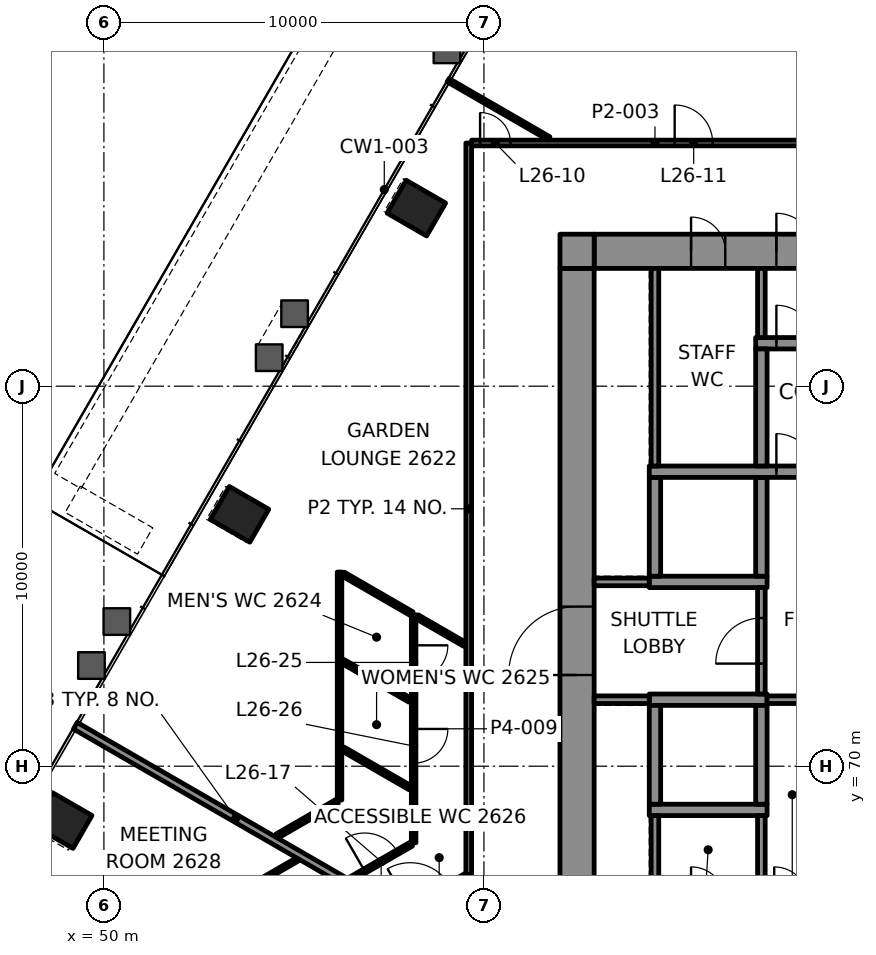
"""IFC4 building model, lengths in metres.
Left out: names, types, materials, properties, quantities, classifications, styles, units other than length and angle.
Written with IfcOpenShell. Run it as: python <this file> out.ifc"""

import sys

from ifc_helpers import new_model, si_unit, direction, frame, frame_2d, origin, origin_2d, place, context, subcontext, project, spatial, rectangle, extrude, element, fill, save


model = new_model("IFC4")
c1 = context("Model", 3, precision=1e-05, world=origin(), true_north=direction((0.0, 1.0)))
c2 = subcontext(c1, "Body", "Model", "MODEL_VIEW")
j1 = project(units=[si_unit("LENGTHUNIT", "METRE"), si_unit("PLANEANGLEUNIT", "RADIAN")], contexts=[c1])
p1 = place(None, origin())
s1 = spatial("IfcSite", under=j1, at=p1, CompositionType="ELEMENT")
p2 = place(p1, origin())
s2 = spatial("IfcBuilding", under=s1, at=p2, CompositionType="ELEMENT")
p3 = place(p2, frame((0.0, 0.0, 115.6)))
s3 = spatial("IfcBuildingStorey", under=s2, at=p3, CompositionType="ELEMENT", Elevation=115.6)
for number, where, z_axis, x_axis in (
    (1, (58.222, 84.687, -0.0), (0.0, 0.0, 1.0), (-0.5, -0.866, 0.0)),
    (2, (53.569, 76.628, -0.0), (0.0, 0.0, 1.0), (-0.5, -0.866, 0.0)),
    (3, (48.917, 68.57, -0.0), (0.0, 0.0, 1.0), (-0.5, -0.866, 0.0)),
):
    element("IfcColumn", number, at=place(p3, frame(where, z_axis=z_axis, x_axis=x_axis)), inside=s3, PredefinedType="COLUMN", context=c2, shape_type="SweptSolid", body=[
        extrude(rectangle(XDim=1.0, YDim=1.2, at=origin_2d()), origin(), (0.0, 0.0, 1.0), 4.2),
    ])
p4 = place(p3, frame((62.9, 83.55, 0.0), z_axis=(0.0, 0.0, 1.0), x_axis=(1.0, 0.0, 0.0)))
e4 = element("IfcWall", 4, at=p4, inside=s3, PredefinedType="SHEAR", context=c2, shape_type="SweptSolid", body=[
    extrude(rectangle(XDim=25.1, YDim=0.9, at=frame_2d((12.55, 0.0))), origin(), (0.0, 0.0, 1.0), 4.0),
])
p5 = place(p4, frame((4.795, 0.0, 0.0)))
e5 = element("IfcOpeningElement", 5, at=p5, cuts=e4, PredefinedType="OPENING", context=c2, shape_type="SweptSolid", body=[
    extrude(rectangle(XDim=1.0, YDim=2.1, at=frame_2d((0.5, 1.05))), frame((0.0, 0.46, 0.0), z_axis=(0.0, -1.0, 0.0), x_axis=(1.0, 0.0, 0.0)), (0.0, 0.0, 1.0), 0.92),
])
p6 = place(p4, frame((18.605, 0.0, 0.0)))
e6 = element("IfcOpeningElement", 6, at=p6, cuts=e4, PredefinedType="OPENING", context=c2, shape_type="SweptSolid", body=[
    extrude(rectangle(XDim=1.0, YDim=2.1, at=frame_2d((0.5, 1.05))), frame((0.0, 0.46, 0.0), z_axis=(0.0, -1.0, 0.0), x_axis=(1.0, 0.0, 0.0)), (0.0, 0.0, 1.0), 0.92),
])
p7 = place(p4, frame((2.55, 0.0, 0.0)))
e7 = element("IfcOpeningElement", 7, at=p7, cuts=e4, PredefinedType="OPENING", context=c2, shape_type="SweptSolid", body=[
    extrude(rectangle(XDim=0.9, YDim=2.1, at=frame_2d((0.45, 1.05))), frame((0.0, 0.46, 0.0), z_axis=(0.0, -1.0, 0.0), x_axis=(1.0, 0.0, 0.0)), (0.0, 0.0, 1.0), 0.92),
])
p8 = place(p4, frame((11.75, 0.0, 0.0)))
e8 = element("IfcOpeningElement", 8, at=p8, cuts=e4, PredefinedType="OPENING", context=c2, shape_type="SweptSolid", body=[
    extrude(rectangle(XDim=0.9, YDim=2.1, at=frame_2d((0.45, 1.05))), frame((0.0, 0.46, 0.0), z_axis=(0.0, -1.0, 0.0), x_axis=(1.0, 0.0, 0.0)), (0.0, 0.0, 1.0), 0.92),
])
p9 = place(p4, frame((21.65, 0.0, 0.0)))
e9 = element("IfcOpeningElement", 9, at=p9, cuts=e4, PredefinedType="OPENING", context=c2, shape_type="SweptSolid", body=[
    extrude(rectangle(XDim=0.9, YDim=2.1, at=frame_2d((0.45, 1.05))), frame((0.0, 0.46, 0.0), z_axis=(0.0, -1.0, 0.0), x_axis=(1.0, 0.0, 0.0)), (0.0, 0.0, 1.0), 0.92),
])
p10 = place(p3, frame((62.45, 66.9, 0.0), z_axis=(0.0, 0.0, 1.0), x_axis=(0.0, 1.0, 0.0)))
e10 = element("IfcWall", 10, at=p10, inside=s3, PredefinedType="SHEAR", context=c2, shape_type="SweptSolid", body=[
    extrude(rectangle(XDim=16.2, YDim=0.9, at=frame_2d((8.1, 0.0))), origin(), (0.0, 0.0, 1.0), 4.0),
])
p11 = place(p10, frame((5.5, 0.0, 0.0)))
e11 = element("IfcOpeningElement", 11, at=p11, cuts=e10, PredefinedType="OPENING", context=c2, shape_type="SweptSolid", body=[
    extrude(rectangle(XDim=1.8, YDim=2.1, at=frame_2d((0.9, 1.05))), frame((0.0, 0.46, 0.0), z_axis=(0.0, -1.0, 0.0), x_axis=(1.0, 0.0, 0.0)), (0.0, 0.0, 1.0), 0.92),
])
for number, where, z_axis, x_axis in (
    (12, (64.35, 68.85, 0.0), (0.0, 0.0, 1.0), (1.0, 0.0, 0.0)),
    (13, (64.35, 71.75, 0.0), (0.0, 0.0, 1.0), (1.0, 0.0, 0.0)),
    (14, (64.35, 74.85, 0.0), (0.0, 0.0, 1.0), (1.0, 0.0, 0.0)),
):
    element("IfcWall", number, at=place(p3, frame(where, z_axis=z_axis, x_axis=x_axis)), inside=s3, PredefinedType="SHEAR", context=c2, shape_type="SweptSolid", body=[
        extrude(rectangle(XDim=3.1, YDim=0.3, at=frame_2d((1.55, 0.0))), origin(), (0.0, 0.0, 1.0), 4.0),
    ])
for number, where, z_axis, x_axis in (
    (15, (64.5, 69.0, 0.0), (0.0, 0.0, 1.0), (0.0, 1.0, 0.0)),
    (16, (64.5, 75.0, 0.0), (0.0, 0.0, 1.0), (0.0, 1.0, 0.0)),
    (17, (67.3, 69.0, 0.0), (0.0, 0.0, 1.0), (0.0, 1.0, 0.0)),
    (18, (67.3, 75.0, 0.0), (0.0, 0.0, 1.0), (0.0, 1.0, 0.0)),
):
    element("IfcWall", number, at=place(p3, frame(where, z_axis=z_axis, x_axis=x_axis)), inside=s3, PredefinedType="SHEAR", context=c2, shape_type="SweptSolid", body=[
        extrude(rectangle(XDim=2.6, YDim=0.3, at=frame_2d((1.3, 0.0))), origin(), (0.0, 0.0, 1.0), 4.0),
    ])
p12 = place(p3, frame((64.35, 77.75, 0.0), z_axis=(0.0, 0.0, 1.0), x_axis=(1.0, 0.0, 0.0)))
e19 = element("IfcWall", 19, at=p12, inside=s3, PredefinedType="SHEAR", context=c2, shape_type="SweptSolid", body=[
    extrude(rectangle(XDim=22.75, YDim=0.3, at=frame_2d((11.375, 0.0))), origin(), (0.0, 0.0, 1.0), 4.0),
])
p13 = place(p12, frame((3.345, 0.0, 0.0)))
e20 = element("IfcOpeningElement", 20, at=p13, cuts=e19, PredefinedType="OPENING", context=c2, shape_type="SweptSolid", body=[
    extrude(rectangle(XDim=1.0, YDim=2.1, at=frame_2d((0.5, 1.05))), frame((0.0, 0.16, 0.0), z_axis=(0.0, -1.0, 0.0), x_axis=(1.0, 0.0, 0.0)), (0.0, 0.0, 1.0), 0.32),
])
p14 = place(p3, frame((67.15, 81.13, 0.0), z_axis=(0.0, 0.0, 1.0), x_axis=(1.0, 0.0, 0.0)))
e21 = element("IfcWall", 21, at=p14, inside=s3, PredefinedType="SHEAR", context=c2, shape_type="SweptSolid", body=[
    extrude(rectangle(XDim=6.91, YDim=0.3, at=frame_2d((3.455, 0.0))), origin(), (0.0, 0.0, 1.0), 4.0),
])
p15 = place(p14, frame((0.545, 0.0, 0.0)))
e22 = element("IfcOpeningElement", 22, at=p15, cuts=e21, PredefinedType="OPENING", context=c2, shape_type="SweptSolid", body=[
    extrude(rectangle(XDim=1.0, YDim=2.1, at=frame_2d((0.5, 1.05))), frame((0.0, 0.16, 0.0), z_axis=(0.0, -1.0, 0.0), x_axis=(1.0, 0.0, 0.0)), (0.0, 0.0, 1.0), 0.32),
])
p16 = place(p3, frame((67.3, 77.9, 0.0), z_axis=(0.0, 0.0, 1.0), x_axis=(0.0, 1.0, 0.0)))
e23 = element("IfcWall", 23, at=p16, inside=s3, PredefinedType="SHEAR", context=c2, shape_type="SweptSolid", body=[
    extrude(rectangle(XDim=3.08, YDim=0.3, at=frame_2d((1.54, 0.0))), origin(), (0.0, 0.0, 1.0), 4.0),
])
p17 = place(p3, frame((62.0, 83.55, 0.0), z_axis=(0.0, 0.0, 1.0), x_axis=(1.0, 0.0, 0.0)))
e24 = element("IfcWall", 24, at=p17, inside=s3, PredefinedType="SHEAR", context=c2, shape_type="SweptSolid", body=[
    extrude(rectangle(XDim=0.9, YDim=0.9, at=frame_2d((0.45, 0.0))), origin(), (0.0, 0.0, 1.0), 4.0),
])
p18 = place(p3, frame((59.676, 86.4, 0.0), z_axis=(0.0, 0.0, 1.0), x_axis=(1.0, 0.0, 0.0)))
e25 = element("IfcWall", 25, at=p18, inside=s3, PredefinedType="PARTITIONING", context=c2, shape_type="SweptSolid", body=[
    extrude(rectangle(XDim=9.649, YDim=0.15, at=frame_2d((4.825, 0.0))), origin(), (0.0, 0.0, 1.0), 3.4),
])
p19 = place(p18, frame((0.223, 0.0, 0.0)))
e26 = element("IfcOpeningElement", 26, at=p19, cuts=e25, PredefinedType="OPENING", context=c2, shape_type="SweptSolid", body=[
    extrude(rectangle(XDim=0.8, YDim=2.1, at=frame_2d((0.4, 1.05))), frame((0.0, 0.085, 0.0), z_axis=(0.0, -1.0, 0.0), x_axis=(1.0, 0.0, 0.0)), (0.0, 0.0, 1.0), 0.17),
])
p20 = place(p18, frame((5.343, 0.0, 0.0)))
e27 = element("IfcOpeningElement", 27, at=p20, cuts=e25, PredefinedType="OPENING", context=c2, shape_type="SweptSolid", body=[
    extrude(rectangle(XDim=1.0, YDim=2.1, at=frame_2d((0.5, 1.05))), frame((0.0, 0.085, 0.0), z_axis=(0.0, -1.0, 0.0), x_axis=(1.0, 0.0, 0.0)), (0.0, 0.0, 1.0), 0.17),
])
p21 = place(p3, frame((47.866, 60.374, 0.0), z_axis=(0.0, 0.0, 1.0), x_axis=(0.866031566243, 0.499989326157, 0.0)))
e28 = element("IfcWall", 28, at=p21, inside=s3, PredefinedType="PARTITIONING", context=c2, shape_type="SweptSolid", body=[
    extrude(rectangle(XDim=13.462, YDim=0.15, at=frame_2d((6.731, 0.0))), origin(), (0.0, 0.0, 1.0), 3.4),
])
p22 = place(p21, frame((11.774, 0.0, 0.0)))
e29 = element("IfcOpeningElement", 29, at=p22, cuts=e28, PredefinedType="OPENING", context=c2, shape_type="SweptSolid", body=[
    extrude(rectangle(XDim=1.2, YDim=2.1, at=frame_2d((0.6, 1.05))), frame((0.0, 0.085, 0.0), z_axis=(0.0, -1.0, 0.0), x_axis=(1.0, 0.0, 0.0)), (0.0, 0.0, 1.0), 0.17),
])
p23 = place(p3, frame((56.501, 67.033, 0.0), z_axis=(0.0, 0.0, 1.0), x_axis=(0.866023842607, 0.500002704028, 0.0)))
e30 = element("IfcWall", 30, at=p23, inside=s3, PredefinedType="PARTITIONING", context=c2, shape_type="SweptSolid", body=[
    extrude(rectangle(XDim=1.835, YDim=0.12, at=frame_2d((0.917, 0.0))), origin(), (0.0, 0.0, 1.0), 3.4),
])
p24 = place(p23, frame((0.417, 0.0, 0.0)))
e31 = element("IfcOpeningElement", 31, at=p24, cuts=e30, PredefinedType="OPENING", context=c2, shape_type="SweptSolid", body=[
    extrude(rectangle(XDim=1.0, YDim=2.1, at=frame_2d((0.5, 1.05))), frame((0.0, 0.07, 0.0), z_axis=(0.0, -1.0, 0.0), x_axis=(1.0, 0.0, 0.0)), (0.0, 0.0, 1.0), 0.14),
])
p25 = place(p3, frame((55.09, 67.547, 0.0), z_axis=(0.0, 0.0, 1.0), x_axis=(-0.8660245535, -0.500001472733, 0.0)))
e32 = element("IfcWall", 32, at=p25, inside=s3, PredefinedType="PARTITIONING", context=c2, shape_type="SweptSolid", body=[
    extrude(rectangle(XDim=6.968, YDim=0.1, at=frame_2d((3.484, 0.0))), origin(), (0.0, 0.0, 1.0), 3.4),
])
p26 = place(p25, frame((3.034, 0.0, 0.0)))
e33 = element("IfcOpeningElement", 33, at=p26, cuts=e32, PredefinedType="OPENING", context=c2, shape_type="SweptSolid", body=[
    extrude(rectangle(XDim=0.9, YDim=2.1, at=frame_2d((0.45, 1.05))), frame((0.0, 0.06, 0.0), z_axis=(0.0, -1.0, 0.0), x_axis=(1.0, 0.0, 0.0)), (0.0, 0.0, 1.0), 0.12),
])
p27 = place(p3, frame((54.551, 68.159, 0.0), z_axis=(0.0, 0.0, 1.0), x_axis=(0.866023842607, 0.500002704028, 0.0)))
e34 = element("IfcWall", 34, at=p27, inside=s3, PredefinedType="PARTITIONING", context=c2, shape_type="SweptSolid", body=[
    extrude(rectangle(XDim=1.835, YDim=0.12, at=frame_2d((0.917, 0.0))), origin(), (0.0, 0.0, 1.0), 3.4),
])
p28 = place(p3, frame((59.6, 67.148, 0.0), z_axis=(0.0, 0.0, 1.0), x_axis=(0.0, 1.0, 0.0)))
e35 = element("IfcWall", 35, at=p28, inside=s3, PredefinedType="PARTITIONING", context=c2, shape_type="SweptSolid", body=[
    extrude(rectangle(XDim=19.251, YDim=0.15, at=frame_2d((9.626, 0.0))), origin(), (0.0, 0.0, 1.0), 3.4),
])
p29 = place(p3, frame((58.15, 73.984, 0.0), z_axis=(0.0, 0.0, 1.0), x_axis=(0.0, -1.0, 0.0)))
e36 = element("IfcWall", 36, at=p29, inside=s3, PredefinedType="PARTITIONING", context=c2, shape_type="SweptSolid", body=[
    extrude(rectangle(XDim=5.999, YDim=0.12, at=frame_2d((3.0, 0.0))), origin(), (0.0, 0.0, 1.0), 3.4),
])
p30 = place(p29, frame((0.803, 0.0, 0.0)))
e37 = element("IfcOpeningElement", 37, at=p30, cuts=e36, PredefinedType="OPENING", context=c2, shape_type="SweptSolid", body=[
    extrude(rectangle(XDim=0.9, YDim=2.1, at=frame_2d((0.45, 1.05))), frame((0.0, 0.07, 0.0), z_axis=(0.0, -1.0, 0.0), x_axis=(1.0, 0.0, 0.0)), (0.0, 0.0, 1.0), 0.14),
])
p31 = place(p29, frame((3.003, 0.0, 0.0)))
e38 = element("IfcOpeningElement", 38, at=p31, cuts=e36, PredefinedType="OPENING", context=c2, shape_type="SweptSolid", body=[
    extrude(rectangle(XDim=0.9, YDim=2.1, at=frame_2d((0.45, 1.05))), frame((0.0, 0.07, 0.0), z_axis=(0.0, -1.0, 0.0), x_axis=(1.0, 0.0, 0.0)), (0.0, 0.0, 1.0), 0.14),
])
p32 = place(p3, frame((56.2, 69.111, 0.0), z_axis=(0.0, 0.0, 1.0), x_axis=(0.0, 1.0, 0.0)))
e39 = element("IfcWall", 39, at=p32, inside=s3, PredefinedType="PARTITIONING", context=c2, shape_type="SweptSolid", body=[
    extrude(rectangle(XDim=5.999, YDim=0.12, at=frame_2d((2.999, 0.0))), origin(), (0.0, 0.0, 1.0), 3.4),
])
p33 = place(p3, frame((61.71, 86.52, 0.0), z_axis=(0.0, 0.0, 1.0), x_axis=(-0.866038331766, 0.499977607411, 0.0)))
e40 = element("IfcWall", 40, at=p33, inside=s3, PredefinedType="PARTITIONING", context=c2, shape_type="SweptSolid", body=[
    extrude(rectangle(XDim=3.065, YDim=0.1, at=frame_2d((1.532, 0.0))), origin(), (0.0, 0.0, 1.0), 3.165),
])
p34 = place(p3, frame((59.49, 73.21, 0.0), z_axis=(0.0, 0.0, 1.0), x_axis=(-0.86596595808, 0.500102948848, 0.0)))
e41 = element("IfcWall", 41, at=p34, inside=s3, PredefinedType="PARTITIONING", context=c2, shape_type="SweptSolid", body=[
    extrude(rectangle(XDim=1.444, YDim=0.12, at=frame_2d((0.722, 0.0))), origin(), (0.0, 0.0, 1.0), 3.4),
])
for number, where, z_axis, x_axis in (
    (42, (58.055, 71.736, 0.0), (0.0, 0.0, 1.0), (-0.866, 0.5, 0.0)),
    (43, (58.055, 69.434, 0.0), (0.0, 0.0, 1.0), (-0.866, 0.5, 0.0)),
):
    element("IfcWall", number, at=place(p3, frame(where, z_axis=z_axis, x_axis=x_axis)), inside=s3, PredefinedType="PARTITIONING", context=c2, shape_type="SweptSolid", body=[
        extrude(rectangle(XDim=2.033, YDim=0.12, at=frame_2d((1.017, 0.0))), origin(), (0.0, 0.0, 1.0), 3.4),
    ])
p35 = place(p3, frame((57.689, 66.191, 0.0), z_axis=(0.0, 0.0, 1.0), x_axis=(-0.866022484486, 0.500005056339, 0.0)))
e44 = element("IfcWall", 44, at=p35, inside=s3, PredefinedType="PARTITIONING", context=c2, shape_type="SweptSolid", body=[
    extrude(rectangle(XDim=9.747, YDim=0.2, at=frame_2d((4.873, 0.0))), origin(), (0.0, 0.0, 1.0), 3.165),
])
p36 = place(p3, frame((58.105, 74.01, 0.0), z_axis=(0.0, 0.0, 1.0), x_axis=(-0.866028046028, 0.499995423472, 0.0)))
e45 = element("IfcWall", 45, at=p36, inside=s3, PredefinedType="PARTITIONING", context=c2, shape_type="SweptSolid", body=[
    extrude(rectangle(XDim=2.09, YDim=0.12, at=frame_2d((1.045, 0.0))), origin(), (0.0, 0.0, 1.0), 3.4),
])
p37 = place(p3, frame((69.117, 112.258, 0.0), z_axis=(0.0, 0.0, 1.0), x_axis=(-0.5000008632, -0.866024905415, 0.0)))
e46 = element("IfcWall", 46, at=p37, inside=s3, PredefinedType="SOLIDWALL", context=c2, shape_type="SweptSolid", body=[
    extrude(rectangle(XDim=40.13, YDim=0.8, at=frame_2d((20.065, 0.0))), origin(), (0.0, 0.0, 1.0), 0.9),
])
p38 = place(p3, frame((49.18, 77.026, 0.0), z_axis=(0.0, 0.0, 1.0), x_axis=(0.866008176907, -0.50002983664, 0.0)))
e47 = element("IfcWall", 47, at=p38, inside=s3, PredefinedType="SOLIDWALL", context=c2, shape_type="SweptSolid", body=[
    extrude(rectangle(XDim=2.2, YDim=0.8, at=frame_2d((1.1, 0.0))), origin(), (0.0, 0.0, 1.0), 0.9),
])
p39 = place(p3, frame((62.9, 71.75, 0.0), z_axis=(0.0, 0.0, 1.0), x_axis=(1.0, 0.0, 0.0)))
e48 = element("IfcWall", 48, at=p39, inside=s3, PredefinedType="PARTITIONING", context=c2, shape_type="SweptSolid", body=[
    extrude(rectangle(XDim=1.45, YDim=0.2, at=frame_2d((0.725, 0.0))), origin(), (0.0, 0.0, 1.0), 4.0),
])
p40 = place(p3, frame((67.45, 71.75, 0.0), z_axis=(0.0, 0.0, 1.0), x_axis=(1.0, 0.0, 0.0)))
e49 = element("IfcWall", 49, at=p40, inside=s3, PredefinedType="PARTITIONING", context=c2, shape_type="SweptSolid", body=[
    extrude(rectangle(XDim=2.85, YDim=0.2, at=frame_2d((1.425, 0.0))), origin(), (0.0, 0.0, 1.0), 4.0),
])
p41 = place(p3, frame((62.9, 74.85, 0.0), z_axis=(0.0, 0.0, 1.0), x_axis=(1.0, 0.0, 0.0)))
e50 = element("IfcWall", 50, at=p41, inside=s3, PredefinedType="PARTITIONING", context=c2, shape_type="SweptSolid", body=[
    extrude(rectangle(XDim=1.45, YDim=0.2, at=frame_2d((0.725, 0.0))), origin(), (0.0, 0.0, 1.0), 4.0),
])
p42 = place(p3, frame((64.5, 66.9, 0.0), z_axis=(0.0, 0.0, 1.0), x_axis=(0.0, 1.0, 0.0)))
e51 = element("IfcWall", 51, at=p42, inside=s3, PredefinedType="PARTITIONING", context=c2, shape_type="SweptSolid", body=[
    extrude(rectangle(XDim=1.8, YDim=0.2, at=frame_2d((0.9, 0.0))), origin(), (0.0, 0.0, 1.0), 4.0),
])
p43 = place(p3, frame((64.5, 77.9, 0.0), z_axis=(0.0, 0.0, 1.0), x_axis=(0.0, 1.0, 0.0)))
e52 = element("IfcWall", 52, at=p43, inside=s3, PredefinedType="PARTITIONING", context=c2, shape_type="SweptSolid", body=[
    extrude(rectangle(XDim=5.2, YDim=0.2, at=frame_2d((2.6, 0.0))), origin(), (0.0, 0.0, 1.0), 4.0),
])
p44 = place(p3, frame((67.3, 66.9, 0.0), z_axis=(0.0, 0.0, 1.0), x_axis=(0.0, 1.0, 0.0)))
e53 = element("IfcWall", 53, at=p44, inside=s3, PredefinedType="PARTITIONING", context=c2, shape_type="SweptSolid", body=[
    extrude(rectangle(XDim=1.8, YDim=0.2, at=frame_2d((0.9, 0.0))), origin(), (0.0, 0.0, 1.0), 4.0),
])
p45 = place(p3, frame((67.3, 71.9, 0.0), z_axis=(0.0, 0.0, 1.0), x_axis=(0.0, 1.0, 0.0)))
e54 = element("IfcWall", 54, at=p45, inside=s3, PredefinedType="PARTITIONING", context=c2, shape_type="SweptSolid", body=[
    extrude(rectangle(XDim=2.8, YDim=0.2, at=frame_2d((1.4, 0.0))), origin(), (0.0, 0.0, 1.0), 4.0),
])
p46 = place(p45, frame((0.8, 0.0, 0.0)))
e55 = element("IfcOpeningElement", 55, at=p46, cuts=e54, PredefinedType="OPENING", context=c2, shape_type="SweptSolid", body=[
    extrude(rectangle(XDim=1.2, YDim=2.1, at=frame_2d((0.6, 1.05))), frame((0.0, 0.11, 0.0), z_axis=(0.0, -1.0, 0.0), x_axis=(1.0, 0.0, 0.0)), (0.0, 0.0, 1.0), 0.22),
])
p47 = place(p3, frame((67.3, 81.28, 0.0), z_axis=(0.0, 0.0, 1.0), x_axis=(0.0, 1.0, 0.0)))
e56 = element("IfcWall", 56, at=p47, inside=s3, PredefinedType="PARTITIONING", context=c2, shape_type="SweptSolid", body=[
    extrude(rectangle(XDim=1.82, YDim=0.2, at=frame_2d((0.91, 0.0))), origin(), (0.0, 0.0, 1.0), 4.0),
])
p48 = place(p19, origin())
e57 = element("IfcDoor", 57, at=p48, inside=s3, OperationType="SINGLE_SWING_LEFT", PredefinedType="DOOR", context=c2, shape_type="SweptSolid", body=[
    extrude(rectangle(XDim=0.8, YDim=2.1, at=frame_2d((0.4, 1.05))), frame((0.0, 0.025, 0.0), z_axis=(0.0, -1.0, 0.0), x_axis=(1.0, 0.0, 0.0)), (0.0, 0.0, 1.0), 0.05),
])
fill(e26, e57)
p49 = place(p20, origin())
e58 = element("IfcDoor", 58, at=p49, inside=s3, OperationType="SINGLE_SWING_RIGHT", PredefinedType="DOOR", context=c2, shape_type="SweptSolid", body=[
    extrude(rectangle(XDim=1.0, YDim=2.1, at=frame_2d((0.5, 1.05))), frame((0.0, 0.025, 0.0), z_axis=(0.0, -1.0, 0.0), x_axis=(1.0, 0.0, 0.0)), (0.0, 0.0, 1.0), 0.05),
])
fill(e27, e58)
p50 = place(p24, origin())
e59 = element("IfcDoor", 59, at=p50, inside=s3, OperationType="SINGLE_SWING_LEFT", PredefinedType="DOOR", context=c2, shape_type="SweptSolid", body=[
    extrude(rectangle(XDim=1.0, YDim=2.1, at=frame_2d((0.5, 1.05))), frame((0.0, 0.025, 0.0), z_axis=(0.0, -1.0, 0.0), x_axis=(1.0, 0.0, 0.0)), (0.0, 0.0, 1.0), 0.05),
])
fill(e31, e59)
p51 = place(p30, origin())
e60 = element("IfcDoor", 60, at=p51, inside=s3, OperationType="SINGLE_SWING_RIGHT", PredefinedType="DOOR", context=c2, shape_type="SweptSolid", body=[
    extrude(rectangle(XDim=0.9, YDim=2.1, at=frame_2d((0.45, 1.05))), frame((0.0, 0.025, 0.0), z_axis=(0.0, -1.0, 0.0), x_axis=(1.0, 0.0, 0.0)), (0.0, 0.0, 1.0), 0.05),
])
fill(e37, e60)
p52 = place(p31, origin())
e61 = element("IfcDoor", 61, at=p52, inside=s3, OperationType="SINGLE_SWING_LEFT", PredefinedType="DOOR", context=c2, shape_type="SweptSolid", body=[
    extrude(rectangle(XDim=0.9, YDim=2.1, at=frame_2d((0.45, 1.05))), frame((0.0, 0.025, 0.0), z_axis=(0.0, -1.0, 0.0), x_axis=(1.0, 0.0, 0.0)), (0.0, 0.0, 1.0), 0.05),
])
fill(e38, e61)
p53 = place(p13, origin())
e62 = element("IfcDoor", 62, at=p53, inside=s3, OperationType="SINGLE_SWING_LEFT", PredefinedType="DOOR", context=c2, shape_type="SweptSolid", body=[
    extrude(rectangle(XDim=1.0, YDim=2.1, at=frame_2d((0.5, 1.05))), frame((0.0, 0.025, 0.0), z_axis=(0.0, -1.0, 0.0), x_axis=(1.0, 0.0, 0.0)), (0.0, 0.0, 1.0), 0.05),
])
fill(e20, e62)
p54 = place(p15, origin())
e63 = element("IfcDoor", 63, at=p54, inside=s3, OperationType="SINGLE_SWING_RIGHT", PredefinedType="DOOR", context=c2, shape_type="SweptSolid", body=[
    extrude(rectangle(XDim=1.0, YDim=2.1, at=frame_2d((0.5, 1.05))), frame((0.0, 0.025, 0.0), z_axis=(0.0, -1.0, 0.0), x_axis=(1.0, 0.0, 0.0)), (0.0, 0.0, 1.0), 0.05),
])
fill(e22, e63)
p55 = place(p5, origin())
e64 = element("IfcDoor", 64, at=p55, inside=s3, OperationType="SINGLE_SWING_LEFT", PredefinedType="DOOR", context=c2, shape_type="SweptSolid", body=[
    extrude(rectangle(XDim=1.0, YDim=2.1, at=frame_2d((0.5, 1.05))), frame((0.0, 0.17, 0.0), z_axis=(0.0, -1.0, 0.0), x_axis=(1.0, 0.0, 0.0)), (0.0, 0.0, 1.0), 0.34),
])
fill(e5, e64)
p56 = place(p46, origin())
e65 = element("IfcDoor", 65, at=p56, inside=s3, OperationType="SINGLE_SWING_RIGHT", PredefinedType="DOOR", context=c2, shape_type="SweptSolid", body=[
    extrude(rectangle(XDim=1.2, YDim=2.1, at=frame_2d((0.6, 1.05))), frame((0.0, 0.025, 0.0), z_axis=(0.0, -1.0, 0.0), x_axis=(1.0, 0.0, 0.0)), (0.0, 0.0, 1.0), 0.05),
])
fill(e55, e65)
p57 = place(p11, origin())
e66 = element("IfcDoor", 66, at=p57, inside=s3, OperationType="SINGLE_SWING_LEFT", PredefinedType="DOOR", context=c2, shape_type="SweptSolid", body=[
    extrude(rectangle(XDim=1.8, YDim=2.1, at=frame_2d((0.9, 1.05))), frame((0.0, 0.17, 0.0), z_axis=(0.0, -1.0, 0.0), x_axis=(1.0, 0.0, 0.0)), (0.0, 0.0, 1.0), 0.34),
])
fill(e11, e66)
p58 = place(p7, origin())
e67 = element("IfcDoor", 67, at=p58, inside=s3, OperationType="SINGLE_SWING_RIGHT", PredefinedType="DOOR", context=c2, shape_type="SweptSolid", body=[
    extrude(rectangle(XDim=0.9, YDim=2.1, at=frame_2d((0.45, 1.05))), frame((0.0, 0.17, 0.0), z_axis=(0.0, -1.0, 0.0), x_axis=(1.0, 0.0, 0.0)), (0.0, 0.0, 1.0), 0.34),
])
fill(e7, e67)
save(model, sys.argv[1])
